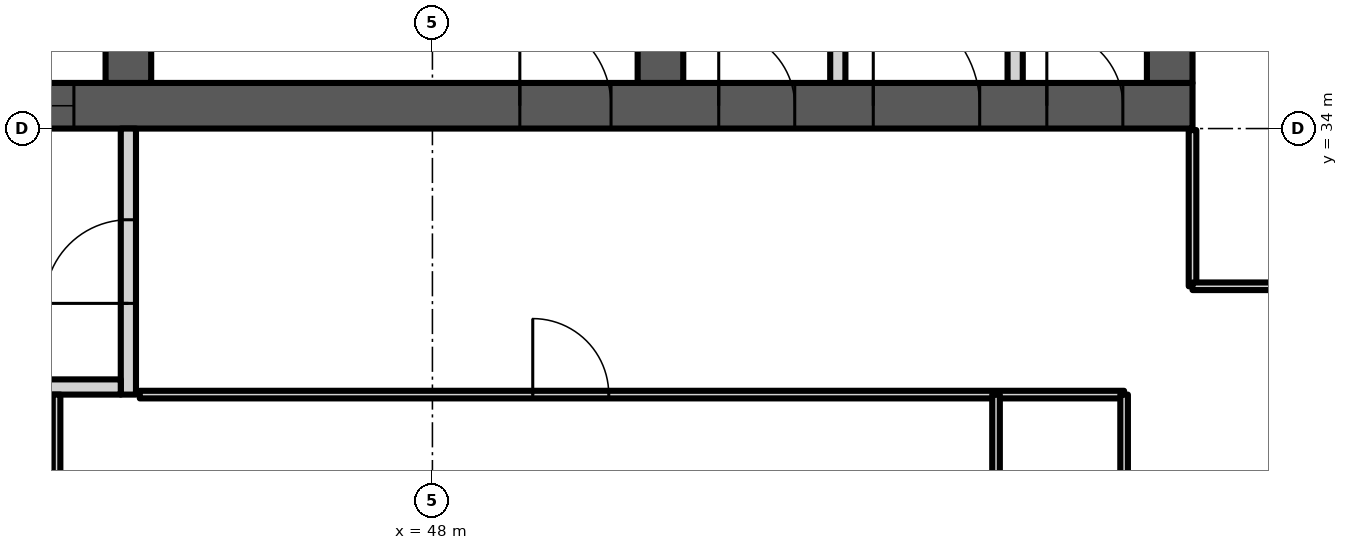
"""IFC4 building model, lengths in metres.
Left out: names, types, materials, properties, quantities, classifications, styles, units other than length and angle.
Written with IfcOpenShell. Run it as: python <this file> out.ifc"""

import sys

from ifc_helpers import new_model, si_unit, direction, frame, frame_2d, origin, place, context, subcontext, project, spatial, polyline, rectangle, outline, extrude, element, fill, save


model = new_model("IFC4")
c1 = context("Model", 3, precision=1e-05, world=origin(), true_north=direction((0.0, 1.0)))
c2 = subcontext(c1, "Body", "Model", "MODEL_VIEW")
j1 = project(units=[si_unit("LENGTHUNIT", "METRE"), si_unit("PLANEANGLEUNIT", "RADIAN")], contexts=[c1])
p1 = place(None, origin())
s1 = spatial("IfcSite", under=j1, at=p1, CompositionType="ELEMENT")
p2 = place(p1, origin())
s2 = spatial("IfcBuilding", under=s1, at=p2, CompositionType="ELEMENT")
p3 = place(p2, frame((0.0, 0.0, 232.3)))
s3 = spatial("IfcBuildingStorey", under=s2, at=p3, CompositionType="ELEMENT", Elevation=232.3)
p4 = place(p3, frame((23.0, 34.3, 0.0), z_axis=(0.0, 0.0, 1.0), x_axis=(1.0, 0.0, 0.0)))
e1 = element("IfcWall", 1, at=p4, inside=s3, PredefinedType="SHEAR", context=c2, shape_type="SweptSolid", body=[
    extrude(rectangle(XDim=35.0, YDim=0.6, at=frame_2d((17.5, 0.0))), origin(), (0.0, 0.0, 1.0), 3.6),
])
p5 = place(p4, frame((0.65, 0.0, 0.0)))
e2 = element("IfcOpeningElement", 2, at=p5, cuts=e1, PredefinedType="OPENING", context=c2, shape_type="SweptSolid", body=[
    extrude(rectangle(XDim=1.2, YDim=2.1, at=frame_2d((0.6, 1.05))), frame((0.0, 0.31, 0.0), z_axis=(0.0, -1.0, 0.0), x_axis=(1.0, 0.0, 0.0)), (0.0, 0.0, 1.0), 0.62),
])
p6 = place(p4, frame((7.717, 0.0, 0.0)))
e3 = element("IfcOpeningElement", 3, at=p6, cuts=e1, PredefinedType="OPENING", context=c2, shape_type="SweptSolid", body=[
    extrude(rectangle(XDim=1.1, YDim=2.1, at=frame_2d((0.55, 1.05))), frame((0.0, 0.31, 0.0), z_axis=(0.0, -1.0, 0.0), x_axis=(1.0, 0.0, 0.0)), (0.0, 0.0, 1.0), 0.62),
])
p7 = place(p4, frame((12.183, 0.0, 0.0)))
e4 = element("IfcOpeningElement", 4, at=p7, cuts=e1, PredefinedType="OPENING", context=c2, shape_type="SweptSolid", body=[
    extrude(rectangle(XDim=1.1, YDim=2.1, at=frame_2d((0.55, 1.05))), frame((0.0, 0.31, 0.0), z_axis=(0.0, -1.0, 0.0), x_axis=(1.0, 0.0, 0.0)), (0.0, 0.0, 1.0), 0.62),
])
p8 = place(p4, frame((9.8, 0.0, 0.0)))
e5 = element("IfcOpeningElement", 5, at=p8, cuts=e1, PredefinedType="OPENING", context=c2, shape_type="SweptSolid", body=[
    extrude(rectangle(XDim=1.4, YDim=2.1, at=frame_2d((0.7, 1.05))), frame((0.0, 0.31, 0.0), z_axis=(0.0, -1.0, 0.0), x_axis=(1.0, 0.0, 0.0)), (0.0, 0.0, 1.0), 0.62),
])
p9 = place(p4, frame((14.717, 0.0, 0.0)))
e6 = element("IfcOpeningElement", 6, at=p9, cuts=e1, PredefinedType="OPENING", context=c2, shape_type="SweptSolid", body=[
    extrude(rectangle(XDim=1.1, YDim=2.1, at=frame_2d((0.55, 1.05))), frame((0.0, 0.31, 0.0), z_axis=(0.0, -1.0, 0.0), x_axis=(1.0, 0.0, 0.0)), (0.0, 0.0, 1.0), 0.62),
])
p10 = place(p4, frame((16.95, 0.0, 0.0)))
e7 = element("IfcOpeningElement", 7, at=p10, cuts=e1, PredefinedType="OPENING", context=c2, shape_type="SweptSolid", body=[
    extrude(rectangle(XDim=1.1, YDim=2.1, at=frame_2d((0.55, 1.05))), frame((0.0, 0.31, 0.0), z_axis=(0.0, -1.0, 0.0), x_axis=(1.0, 0.0, 0.0)), (0.0, 0.0, 1.0), 0.62),
])
p11 = place(p4, frame((19.183, 0.0, 0.0)))
e8 = element("IfcOpeningElement", 8, at=p11, cuts=e1, PredefinedType="OPENING", context=c2, shape_type="SweptSolid", body=[
    extrude(rectangle(XDim=1.1, YDim=2.1, at=frame_2d((0.55, 1.05))), frame((0.0, 0.31, 0.0), z_axis=(0.0, -1.0, 0.0), x_axis=(1.0, 0.0, 0.0)), (0.0, 0.0, 1.0), 0.62),
])
p12 = place(p4, frame((26.15, 0.0, 0.0)))
e9 = element("IfcOpeningElement", 9, at=p12, cuts=e1, PredefinedType="OPENING", context=c2, shape_type="SweptSolid", body=[
    extrude(rectangle(XDim=1.2, YDim=2.1, at=frame_2d((0.6, 1.05))), frame((0.0, 0.31, 0.0), z_axis=(0.0, -1.0, 0.0), x_axis=(1.0, 0.0, 0.0)), (0.0, 0.0, 1.0), 0.62),
])
p13 = place(p4, frame((28.767, 0.0, 0.0)))
e10 = element("IfcOpeningElement", 10, at=p13, cuts=e1, PredefinedType="OPENING", context=c2, shape_type="SweptSolid", body=[
    extrude(rectangle(XDim=1.0, YDim=2.1, at=frame_2d((0.5, 1.05))), frame((0.0, 0.31, 0.0), z_axis=(0.0, -1.0, 0.0), x_axis=(1.0, 0.0, 0.0)), (0.0, 0.0, 1.0), 0.62),
])
p14 = place(p4, frame((33.083, 0.0, 0.0)))
e11 = element("IfcOpeningElement", 11, at=p14, cuts=e1, PredefinedType="OPENING", context=c2, shape_type="SweptSolid", body=[
    extrude(rectangle(XDim=1.0, YDim=2.1, at=frame_2d((0.5, 1.05))), frame((0.0, 0.31, 0.0), z_axis=(0.0, -1.0, 0.0), x_axis=(1.0, 0.0, 0.0)), (0.0, 0.0, 1.0), 0.62),
])
p15 = place(p4, frame((30.8, 0.0, 0.0)))
e12 = element("IfcOpeningElement", 12, at=p15, cuts=e1, PredefinedType="OPENING", context=c2, shape_type="SweptSolid", body=[
    extrude(rectangle(XDim=1.4, YDim=2.1, at=frame_2d((0.7, 1.05))), frame((0.0, 0.31, 0.0), z_axis=(0.0, -1.0, 0.0), x_axis=(1.0, 0.0, 0.0)), (0.0, 0.0, 1.0), 0.62),
])
p16 = place(p3, frame((44.0, 34.6, 0.0), z_axis=(0.0, 0.0, 1.0), x_axis=(0.0, 1.0, 0.0)))
e13 = element("IfcWall", 13, at=p16, inside=s3, PredefinedType="SHEAR", context=c2, shape_type="SweptSolid", body=[
    extrude(rectangle(XDim=14.784, YDim=0.6, at=frame_2d((7.392, 0.0))), origin(), (0.0, 0.0, 1.0), 3.6),
])
p17 = place(p16, frame((11.608, 0.0, 0.0)))
e14 = element("IfcOpeningElement", 14, at=p17, cuts=e13, PredefinedType="OPENING", context=c2, shape_type="SweptSolid", body=[
    extrude(rectangle(XDim=1.0, YDim=2.1, at=frame_2d((0.5, 1.05))), frame((0.0, 0.31, 0.0), z_axis=(0.0, -1.0, 0.0), x_axis=(1.0, 0.0, 0.0)), (0.0, 0.0, 1.0), 0.62),
])
p18 = place(p16, frame((3.8, 0.0, 0.0)))
e15 = element("IfcOpeningElement", 15, at=p18, cuts=e13, PredefinedType="OPENING", context=c2, shape_type="SweptSolid", body=[
    extrude(rectangle(XDim=1.1, YDim=2.1, at=frame_2d((0.55, 1.05))), frame((0.0, 0.31, 0.0), z_axis=(0.0, -1.0, 0.0), x_axis=(1.0, 0.0, 0.0)), (0.0, 0.0, 1.0), 0.62),
])
p19 = place(p3, frame((51.0, 34.6, 0.0), z_axis=(0.0, 0.0, 1.0), x_axis=(0.0, 1.0, 0.0)))
e16 = element("IfcWall", 16, at=p19, inside=s3, PredefinedType="SHEAR", context=c2, shape_type="SweptSolid", body=[
    extrude(rectangle(XDim=14.171, YDim=0.6, at=frame_2d((7.085, 0.0))), origin(), (0.0, 0.0, 1.0), 3.6),
])
p20 = place(p19, frame((3.8, 0.0, 0.0)))
e17 = element("IfcOpeningElement", 17, at=p20, cuts=e16, PredefinedType="OPENING", context=c2, shape_type="SweptSolid", body=[
    extrude(rectangle(XDim=1.1, YDim=2.1, at=frame_2d((0.55, 1.05))), frame((0.0, 0.31, 0.0), z_axis=(0.0, -1.0, 0.0), x_axis=(1.0, 0.0, 0.0)), (0.0, 0.0, 1.0), 0.62),
])
p21 = place(p3, frame((57.7, 34.6, 0.0), z_axis=(0.0, 0.0, 1.0), x_axis=(0.0, 1.0, 0.0)))
e18 = element("IfcWall", 18, at=p21, inside=s3, PredefinedType="SHEAR", context=c2, shape_type="SweptSolid", body=[
    extrude(rectangle(XDim=13.585, YDim=0.6, at=frame_2d((6.792, 0.0))), origin(), (0.0, 0.0, 1.0), 3.6),
])
p22 = place(p3, frame((0.0, 0.0, -0.0)))
e19 = element("IfcWall", 19, at=p22, inside=s3, PredefinedType="PARTITIONING", context=c2, shape_type="SweptSolid", body=[
    extrude(outline(polyline([(41.567, 37.1), (39.433, 37.1), (39.433, 34.6), (39.233, 34.6), (39.233, 37.45), (37.3, 37.45), (37.3, 37.65), (39.233, 37.65), (39.433, 37.65), (39.433, 37.3), (41.567, 37.3), (41.567, 37.35), (41.767, 37.35), (43.7, 37.35), (43.7, 37.15), (41.767, 37.15), (41.767, 34.6), (41.567, 34.6), (41.567, 37.1)])), origin(), (0.0, 0.0, 1.0), 3.2),
])
p23 = place(p3, frame((0.0, 0.0, -0.0)))
e20 = element("IfcWall", 20, at=p23, inside=s3, PredefinedType="PARTITIONING", context=c2, shape_type="SweptSolid", body=[
    extrude(outline(polyline([(53.233, 34.6), (53.233, 37.3), (53.433, 37.3), (53.433, 34.6), (53.233, 34.6)])), origin(), (0.0, 0.0, 1.0), 3.2),
])
p24 = place(p3, frame((0.0, 0.0, -0.0)))
e21 = element("IfcWall", 21, at=p24, inside=s3, PredefinedType="PARTITIONING", context=c2, shape_type="SweptSolid", body=[
    extrude(outline(polyline([(55.567, 34.6), (55.567, 37.3), (55.767, 37.3), (55.767, 34.6), (55.567, 34.6)])), origin(), (0.0, 0.0, 1.0), 3.2),
])
p25 = place(p3, frame((44.0, 30.5, 0.0), z_axis=(0.0, 0.0, 1.0), x_axis=(0.0, 1.0, 0.0)))
e22 = element("IfcWall", 22, at=p25, inside=s3, PredefinedType="PARTITIONING", context=c2, shape_type="SweptSolid", body=[
    extrude(rectangle(XDim=3.5, YDim=0.2, at=frame_2d((1.75, 0.0))), origin(), (0.0, 0.0, 1.0), 3.2),
])
p26 = place(p25, frame((1.2, 0.0, 0.0)))
e23 = element("IfcOpeningElement", 23, at=p26, cuts=e22, PredefinedType="OPENING", context=c2, shape_type="SweptSolid", body=[
    extrude(rectangle(XDim=1.1, YDim=2.1, at=frame_2d((0.55, 1.05))), frame((0.0, 0.11, 0.0), z_axis=(0.0, -1.0, 0.0), x_axis=(1.0, 0.0, 0.0)), (0.0, 0.0, 1.0), 0.22),
])
p27 = place(p3, frame((41.1, 30.6, 0.0), z_axis=(0.0, 0.0, 1.0), x_axis=(1.0, 0.0, 0.0)))
e24 = element("IfcWall", 24, at=p27, inside=s3, PredefinedType="PARTITIONING", context=c2, shape_type="SweptSolid", body=[
    extrude(rectangle(XDim=2.8, YDim=0.2, at=frame_2d((1.4, 0.0))), origin(), (0.0, 0.0, 1.0), 3.2),
])
p28 = place(p3, frame((43.055, 14.86, 0.0), z_axis=(0.0, 0.0, 1.0), x_axis=(0.0, 1.0, 0.0)))
e25 = element("IfcWall", 25, at=p28, inside=s3, PredefinedType="PARTITIONING", context=c2, shape_type="SweptSolid", body=[
    extrude(rectangle(XDim=15.64, YDim=0.1, at=frame_2d((7.82, 0.0))), origin(), (0.0, 0.0, 1.0), 3.2),
])
p29 = place(p28, frame((4.05, 0.0, 0.0)))
e26 = element("IfcOpeningElement", 26, at=p29, cuts=e25, PredefinedType="OPENING", context=c2, shape_type="SweptSolid", body=[
    extrude(rectangle(XDim=1.1, YDim=2.1, at=frame_2d((0.55, 1.05))), frame((0.0, 0.06, 0.0), z_axis=(0.0, -1.0, 0.0), x_axis=(1.0, 0.0, 0.0)), (0.0, 0.0, 1.0), 0.12),
])
p30 = place(p3, frame((44.15, 30.5, 0.0), z_axis=(0.0, 0.0, 1.0), x_axis=(1.0, 0.0, 0.0)))
e27 = element("IfcWall", 27, at=p30, inside=s3, PredefinedType="PARTITIONING", context=c2, shape_type="SweptSolid", body=[
    extrude(rectangle(XDim=12.95, YDim=0.1, at=frame_2d((6.475, 0.0))), origin(), (0.0, 0.0, 1.0), 3.2),
])
p31 = place(p30, frame((5.17, 0.0, 0.0)))
e28 = element("IfcOpeningElement", 28, at=p31, cuts=e27, PredefinedType="OPENING", context=c2, shape_type="SweptSolid", body=[
    extrude(rectangle(XDim=1.0, YDim=2.1, at=frame_2d((0.5, 1.05))), frame((0.0, 0.06, 0.0), z_axis=(0.0, -1.0, 0.0), x_axis=(1.0, 0.0, 0.0)), (0.0, 0.0, 1.0), 0.12),
])
p32 = place(p3, frame((55.415, 4.345, 0.0), z_axis=(0.0, 0.0, 1.0), x_axis=(0.0, 1.0, 0.0)))
e29 = element("IfcWall", 29, at=p32, inside=s3, PredefinedType="PARTITIONING", context=c2, shape_type="SweptSolid", body=[
    extrude(rectangle(XDim=26.155, YDim=0.1, at=frame_2d((13.078, 0.0))), origin(), (0.0, 0.0, 1.0), 3.2),
])
p33 = place(p3, frame((57.1, 14.345, 0.0), z_axis=(0.0, 0.0, 1.0), x_axis=(0.0, 1.0, 0.0)))
e30 = element("IfcWall", 30, at=p33, inside=s3, PredefinedType="PARTITIONING", context=c2, shape_type="SweptSolid", body=[
    extrude(rectangle(XDim=16.155, YDim=0.1, at=frame_2d((8.078, 0.0))), origin(), (0.0, 0.0, 1.0), 3.2),
])
p34 = place(p33, frame((5.215, 0.0, 0.0)))
e31 = element("IfcOpeningElement", 31, at=p34, cuts=e30, PredefinedType="OPENING", context=c2, shape_type="SweptSolid", body=[
    extrude(rectangle(XDim=1.0, YDim=2.1, at=frame_2d((0.5, 1.05))), frame((0.0, 0.06, 0.0), z_axis=(0.0, -1.0, 0.0), x_axis=(1.0, 0.0, 0.0)), (0.0, 0.0, 1.0), 0.12),
])
p35 = place(p3, frame((58.0, 31.925, 0.0), z_axis=(0.0, 0.0, 1.0), x_axis=(0.0, 1.0, 0.0)))
e32 = element("IfcWall", 32, at=p35, inside=s3, PredefinedType="PARTITIONING", context=c2, shape_type="SweptSolid", body=[
    extrude(rectangle(XDim=2.055, YDim=0.1, at=frame_2d((1.027, 0.0))), origin(), (0.0, 0.0, 1.0), 3.2),
])
p36 = place(p3, frame((58.0, 31.925, 0.0), z_axis=(0.0, 0.0, 1.0), x_axis=(1.0, 0.0, 0.0)))
e33 = element("IfcWall", 33, at=p36, inside=s3, PredefinedType="PARTITIONING", context=c2, shape_type="SweptSolid", body=[
    extrude(rectangle(XDim=1.425, YDim=0.1, at=frame_2d((0.712, 0.0))), origin(), (0.0, 0.0, 1.0), 3.2),
])
p37 = place(p3, frame((58.9, 27.435, 0.0), z_axis=(0.0, 0.0, 1.0), x_axis=(0.178584, 0.983924, 0.0)))
e34 = element("IfcWall", 34, at=p37, inside=s3, PredefinedType="PARTITIONING", context=c2, shape_type="SweptSolid", body=[
    extrude(rectangle(XDim=2.353, YDim=0.1, at=frame_2d((1.176, 0.0))), origin(), (0.0, 0.0, 1.0), 3.2),
])
p38 = place(p11, origin())
e35 = element("IfcDoor", 35, at=p38, inside=s3, OperationType="DOUBLE_DOOR_SLIDING", PredefinedType="DOOR", context=c2, shape_type="SweptSolid", body=[
    extrude(rectangle(XDim=1.1, YDim=2.1, at=frame_2d((0.55, 1.05))), frame((0.0, 0.025, 0.0), z_axis=(0.0, -1.0, 0.0), x_axis=(1.0, 0.0, 0.0)), (0.0, 0.0, 1.0), 0.05),
])
fill(e8, e35)
p39 = place(p12, origin())
e36 = element("IfcDoor", 36, at=p39, inside=s3, OperationType="SINGLE_SWING_LEFT", PredefinedType="DOOR", context=c2, shape_type="SweptSolid", body=[
    extrude(rectangle(XDim=1.2, YDim=2.1, at=frame_2d((0.6, 1.05))), frame((0.0, 0.025, 0.0), z_axis=(0.0, -1.0, 0.0), x_axis=(1.0, 0.0, 0.0)), (0.0, 0.0, 1.0), 0.05),
])
fill(e9, e36)
p40 = place(p13, origin())
e37 = element("IfcDoor", 37, at=p40, inside=s3, OperationType="SINGLE_SWING_LEFT", PredefinedType="DOOR", context=c2, shape_type="SweptSolid", body=[
    extrude(rectangle(XDim=1.0, YDim=2.1, at=frame_2d((0.5, 1.05))), frame((0.0, 0.025, 0.0), z_axis=(0.0, -1.0, 0.0), x_axis=(1.0, 0.0, 0.0)), (0.0, 0.0, 1.0), 0.05),
])
fill(e10, e37)
p41 = place(p14, origin())
e38 = element("IfcDoor", 38, at=p41, inside=s3, OperationType="SINGLE_SWING_LEFT", PredefinedType="DOOR", context=c2, shape_type="SweptSolid", body=[
    extrude(rectangle(XDim=1.0, YDim=2.1, at=frame_2d((0.5, 1.05))), frame((0.0, 0.025, 0.0), z_axis=(0.0, -1.0, 0.0), x_axis=(1.0, 0.0, 0.0)), (0.0, 0.0, 1.0), 0.05),
])
fill(e11, e38)
p42 = place(p15, origin())
e39 = element("IfcDoor", 39, at=p42, inside=s3, OperationType="DOUBLE_DOOR_SINGLE_SWING", PredefinedType="DOOR", context=c2, shape_type="SweptSolid", body=[
    extrude(rectangle(XDim=1.4, YDim=2.1, at=frame_2d((0.7, 1.05))), frame((0.0, 0.025, 0.0), z_axis=(0.0, -1.0, 0.0), x_axis=(1.0, 0.0, 0.0)), (0.0, 0.0, 1.0), 0.05),
])
fill(e12, e39)
p43 = place(p26, origin())
e40 = element("IfcDoor", 40, at=p43, inside=s3, OperationType="SINGLE_SWING_LEFT", PredefinedType="DOOR", context=c2, shape_type="SweptSolid", body=[
    extrude(rectangle(XDim=1.1, YDim=2.1, at=frame_2d((0.55, 1.05))), frame((0.0, 0.025, 0.0), z_axis=(0.0, -1.0, 0.0), x_axis=(1.0, 0.0, 0.0)), (0.0, 0.0, 1.0), 0.05),
])
fill(e23, e40)
p44 = place(p31, origin())
e41 = element("IfcDoor", 41, at=p44, inside=s3, OperationType="SINGLE_SWING_LEFT", PredefinedType="DOOR", context=c2, shape_type="SweptSolid", body=[
    extrude(rectangle(XDim=1.0, YDim=2.1, at=frame_2d((0.5, 1.05))), frame((0.0, 0.025, 0.0), z_axis=(0.0, -1.0, 0.0), x_axis=(1.0, 0.0, 0.0)), (0.0, 0.0, 1.0), 0.05),
])
fill(e28, e41)
save(model, sys.argv[1])
